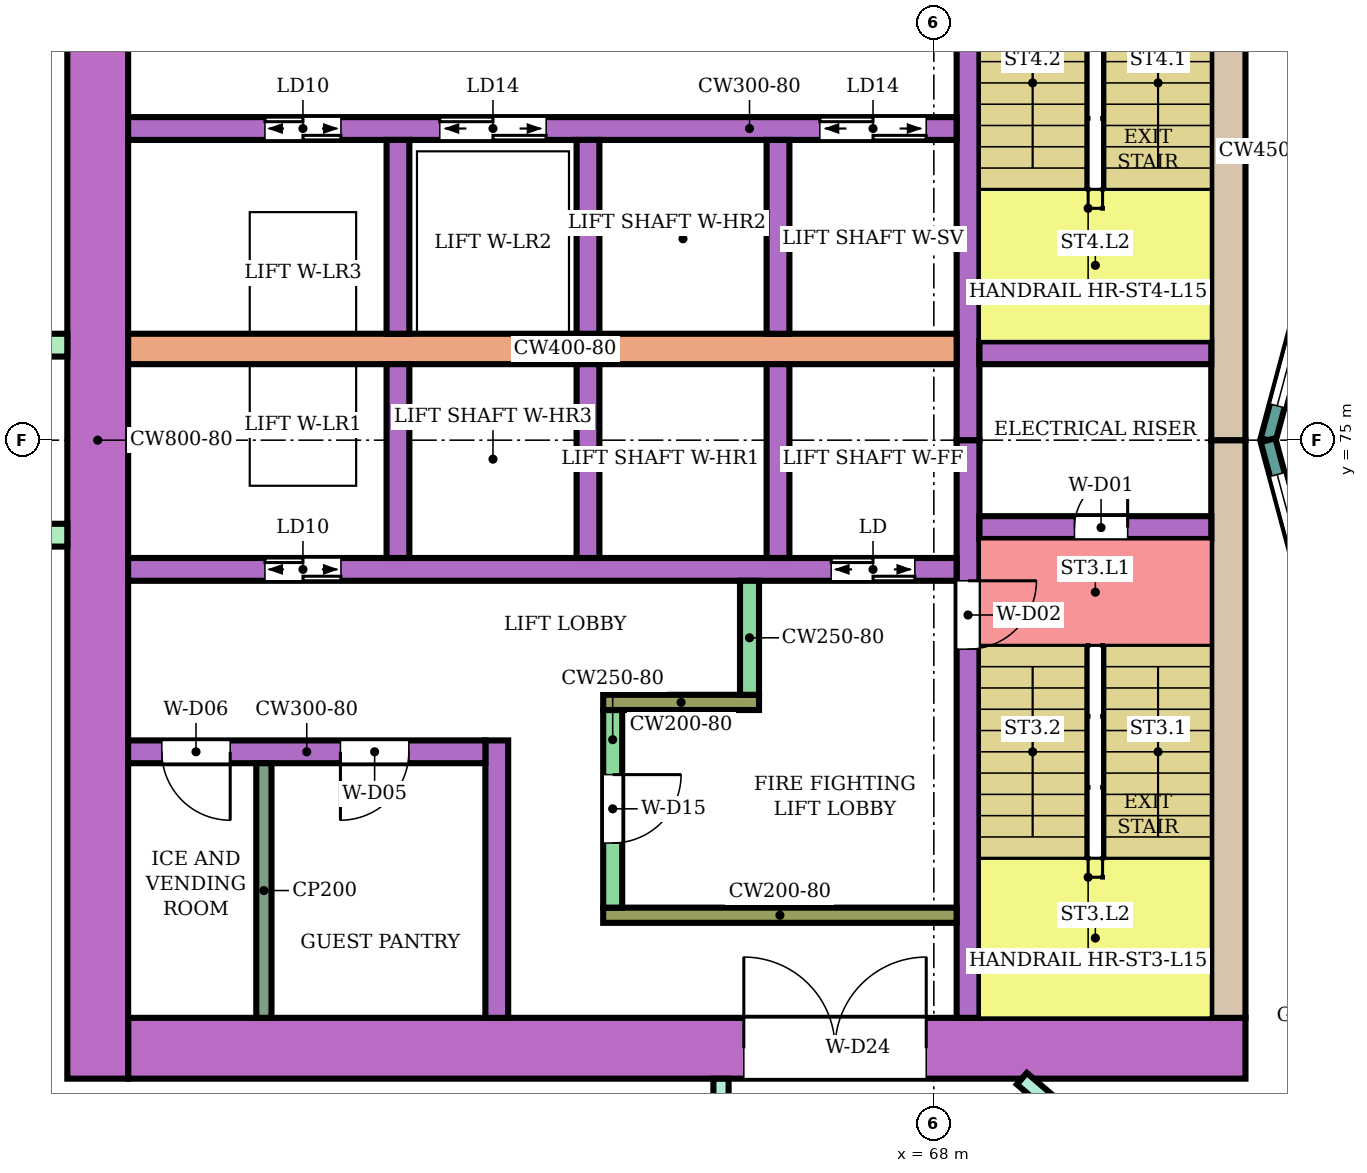
"""IFC4 building model, lengths in metres.
Left out: names, types, materials, properties, quantities, classifications, styles, units other than length and angle.
Written with IfcOpenShell. Run it as: python <this file> out.ifc"""

import sys

from ifc_helpers import new_model, si_unit, direction, frame, frame_2d, origin, place, context, subcontext, project, spatial, rectangle, extrude, element, fill, save


model = new_model("IFC4")
c1 = context("Model", 3, precision=1e-05, world=origin(), true_north=direction((0.0, 1.0)))
c2 = subcontext(c1, "Body", "Model", "MODEL_VIEW")
j1 = project(units=[si_unit("LENGTHUNIT", "METRE"), si_unit("PLANEANGLEUNIT", "RADIAN")], contexts=[c1])
p1 = place(None, origin())
s1 = spatial("IfcSite", under=j1, at=p1, CompositionType="ELEMENT")
p2 = place(p1, origin())
s2 = spatial("IfcBuilding", under=s1, at=p2, CompositionType="ELEMENT")
p3 = place(p2, frame((0.0, 0.0, 66.8)))
s3 = spatial("IfcBuildingStorey", under=s2, at=p3, CompositionType="ELEMENT", Elevation=66.8)
p4 = place(p3, frame((72.1, 67.0, 0.0), z_axis=(0.0, 0.0, 1.0), x_axis=(-1.0, 0.0, 0.0)))
e1 = element("IfcWall", 1, at=p4, inside=s3, PredefinedType="SHEAR", context=c2, shape_type="SweptSolid", body=[
    extrude(rectangle(XDim=14.7, YDim=0.8, at=frame_2d((7.35, 0.0))), origin(), (0.0, 0.0, 1.0), 3.48),
])
p5 = place(p4, frame((4.2, 0.0, 0.0)))
e2 = element("IfcOpeningElement", 2, at=p5, cuts=e1, PredefinedType="OPENING", context=c2, shape_type="SweptSolid", body=[
    extrude(rectangle(XDim=2.4, YDim=2.4, at=frame_2d((1.2, 1.2))), frame((0.0, 0.41, 0.0), z_axis=(0.0, -1.0, 0.0), x_axis=(1.0, 0.0, 0.0)), (0.0, 0.0, 1.0), 0.82),
])
for number, where, z_axis, x_axis in (
    (3, (71.875, 75.0, 0.0), (0.0, 0.0, 1.0), (0.0, -1.0, 0.0)),
    (4, (71.875, 82.6, 0.0), (0.0, 0.0, 1.0), (0.0, -1.0, 0.0)),
):
    element("IfcWall", number, at=place(p3, frame(where, z_axis=z_axis, x_axis=x_axis)), inside=s3, PredefinedType="SHEAR", context=c2, shape_type="SweptSolid", body=[
        extrude(rectangle(XDim=7.6, YDim=0.45, at=frame_2d((3.8, 0.0))), origin(), (0.0, 0.0, 1.0), 3.48),
    ])
p6 = place(p3, frame((57.0, 83.4, 0.0), z_axis=(0.0, 0.0, 1.0), x_axis=(0.0, -1.0, 0.0)))
e5 = element("IfcWall", 5, at=p6, inside=s3, PredefinedType="SHEAR", context=c2, shape_type="SweptSolid", body=[
    extrude(rectangle(XDim=16.8, YDim=0.8, at=frame_2d((8.4, 0.0))), origin(), (0.0, 0.0, 1.0), 3.48),
])
p7 = place(p3, frame((68.45, 75.0, 0.0), z_axis=(0.0, 0.0, 1.0), x_axis=(0.0, -1.0, 0.0)))
e6 = element("IfcWall", 6, at=p7, inside=s3, PredefinedType="SHEAR", context=c2, shape_type="SweptSolid", body=[
    extrude(rectangle(XDim=7.6, YDim=0.3, at=frame_2d((3.8, 0.0))), origin(), (0.0, 0.0, 1.0), 3.48),
])
p8 = place(p7, frame((1.85, 0.0, 0.0)))
e7 = element("IfcOpeningElement", 7, at=p8, cuts=e6, PredefinedType="OPENING", context=c2, shape_type="SweptSolid", body=[
    extrude(rectangle(XDim=0.9, YDim=2.1, at=frame_2d((0.45, 1.05))), frame((0.0, 0.16, 0.0), z_axis=(0.0, -1.0, 0.0), x_axis=(1.0, 0.0, 0.0)), (0.0, 0.0, 1.0), 0.32),
])
p9 = place(p3, frame((68.45, 82.6, 0.0), z_axis=(0.0, 0.0, 1.0), x_axis=(0.0, -1.0, 0.0)))
e8 = element("IfcWall", 8, at=p9, inside=s3, PredefinedType="SHEAR", context=c2, shape_type="SweptSolid", body=[
    extrude(rectangle(XDim=7.6, YDim=0.3, at=frame_2d((3.8, 0.0))), origin(), (0.0, 0.0, 1.0), 3.48),
])
p10 = place(p9, frame((0.25, 0.0, 0.0)))
e9 = element("IfcOpeningElement", 9, at=p10, cuts=e8, PredefinedType="OPENING", context=c2, shape_type="SweptSolid", body=[
    extrude(rectangle(XDim=0.9, YDim=2.1, at=frame_2d((0.45, 1.05))), frame((0.0, 0.16, 0.0), z_axis=(0.0, -1.0, 0.0), x_axis=(1.0, 0.0, 0.0)), (0.0, 0.0, 1.0), 0.32),
])
p11 = place(p3, frame((71.65, 73.85, 0.0), z_axis=(0.0, 0.0, 1.0), x_axis=(-1.0, 0.0, 0.0)))
e10 = element("IfcWall", 10, at=p11, inside=s3, PredefinedType="SHEAR", context=c2, shape_type="SweptSolid", body=[
    extrude(rectangle(XDim=3.05, YDim=0.3, at=frame_2d((1.525, 0.0))), origin(), (0.0, 0.0, 1.0), 3.48),
])
p12 = place(p11, frame((1.1, 0.0, 0.0)))
e11 = element("IfcOpeningElement", 11, at=p12, cuts=e10, PredefinedType="OPENING", context=c2, shape_type="SweptSolid", body=[
    extrude(rectangle(XDim=0.7, YDim=2.0, at=frame_2d((0.35, 1.0))), frame((0.0, 0.16, 0.0), z_axis=(0.0, -1.0, 0.0), x_axis=(1.0, 0.0, 0.0)), (0.0, 0.0, 1.0), 0.32),
])
p13 = place(p3, frame((71.65, 76.15, 0.0), z_axis=(0.0, 0.0, 1.0), x_axis=(-1.0, 0.0, 0.0)))
e12 = element("IfcWall", 12, at=p13, inside=s3, PredefinedType="SHEAR", context=c2, shape_type="SweptSolid", body=[
    extrude(rectangle(XDim=3.05, YDim=0.3, at=frame_2d((1.525, 0.0))), origin(), (0.0, 0.0, 1.0), 3.48),
])
p14 = place(p3, frame((68.3, 73.3, 0.0), z_axis=(0.0, 0.0, 1.0), x_axis=(-1.0, 0.0, 0.0)))
e13 = element("IfcWall", 13, at=p14, inside=s3, PredefinedType="SHEAR", context=c2, shape_type="SweptSolid", body=[
    extrude(rectangle(XDim=10.9, YDim=0.3, at=frame_2d((5.45, 0.0))), origin(), (0.0, 0.0, 1.0), 3.48),
])
p15 = place(p14, frame((0.55, 0.0, 0.0)))
e14 = element("IfcOpeningElement", 14, at=p15, cuts=e13, PredefinedType="OPENING", context=c2, shape_type="SweptSolid", body=[
    extrude(rectangle(XDim=1.1, YDim=2.1, at=frame_2d((0.55, 1.05))), frame((0.0, 0.16, 0.0), z_axis=(0.0, -1.0, 0.0), x_axis=(1.0, 0.0, 0.0)), (0.0, 0.0, 1.0), 0.32),
])
p16 = place(p14, frame((8.1, 0.0, 0.0)))
e15 = element("IfcOpeningElement", 15, at=p16, cuts=e13, PredefinedType="OPENING", context=c2, shape_type="SweptSolid", body=[
    extrude(rectangle(XDim=1.0, YDim=2.1, at=frame_2d((0.5, 1.05))), frame((0.0, 0.16, 0.0), z_axis=(0.0, -1.0, 0.0), x_axis=(1.0, 0.0, 0.0)), (0.0, 0.0, 1.0), 0.32),
])
p17 = place(p3, frame((68.3, 76.2, 0.0), z_axis=(0.0, 0.0, 1.0), x_axis=(-1.0, 0.0, 0.0)))
e16 = element("IfcWall", 16, at=p17, inside=s3, PredefinedType="SHEAR", context=c2, shape_type="SweptSolid", body=[
    extrude(rectangle(XDim=10.9, YDim=0.4, at=frame_2d((5.45, 0.0))), origin(), (0.0, 0.0, 1.0), 3.48),
])
p18 = place(p3, frame((68.3, 79.1, 0.0), z_axis=(0.0, 0.0, 1.0), x_axis=(-1.0, 0.0, 0.0)))
e17 = element("IfcWall", 17, at=p18, inside=s3, PredefinedType="SHEAR", context=c2, shape_type="SweptSolid", body=[
    extrude(rectangle(XDim=10.9, YDim=0.3, at=frame_2d((5.45, 0.0))), origin(), (0.0, 0.0, 1.0), 3.48),
])
p19 = place(p18, frame((0.4, 0.0, 0.0)))
e18 = element("IfcOpeningElement", 18, at=p19, cuts=e17, PredefinedType="OPENING", context=c2, shape_type="SweptSolid", body=[
    extrude(rectangle(XDim=1.4, YDim=2.1, at=frame_2d((0.7, 1.05))), frame((0.0, 0.16, 0.0), z_axis=(0.0, -1.0, 0.0), x_axis=(1.0, 0.0, 0.0)), (0.0, 0.0, 1.0), 0.32),
])
p20 = place(p18, frame((5.4, 0.0, 0.0)))
e19 = element("IfcOpeningElement", 19, at=p20, cuts=e17, PredefinedType="OPENING", context=c2, shape_type="SweptSolid", body=[
    extrude(rectangle(XDim=1.4, YDim=2.1, at=frame_2d((0.7, 1.05))), frame((0.0, 0.16, 0.0), z_axis=(0.0, -1.0, 0.0), x_axis=(1.0, 0.0, 0.0)), (0.0, 0.0, 1.0), 0.32),
])
p21 = place(p18, frame((8.1, 0.0, 0.0)))
e20 = element("IfcOpeningElement", 20, at=p21, cuts=e17, PredefinedType="OPENING", context=c2, shape_type="SweptSolid", body=[
    extrude(rectangle(XDim=1.0, YDim=2.1, at=frame_2d((0.5, 1.05))), frame((0.0, 0.16, 0.0), z_axis=(0.0, -1.0, 0.0), x_axis=(1.0, 0.0, 0.0)), (0.0, 0.0, 1.0), 0.32),
])
for number, where, z_axis, x_axis in (
    (21, (65.95, 76.0, 0.0), (0.0, 0.0, 1.0), (0.0, -1.0, 0.0)),
    (22, (63.45, 76.0, 0.0), (0.0, 0.0, 1.0), (0.0, -1.0, 0.0)),
    (23, (60.95, 76.0, 0.0), (0.0, 0.0, 1.0), (0.0, -1.0, 0.0)),
    (24, (65.95, 78.95, 0.0), (0.0, 0.0, 1.0), (0.0, -1.0, 0.0)),
    (25, (63.45, 78.95, 0.0), (0.0, 0.0, 1.0), (0.0, -1.0, 0.0)),
    (26, (60.95, 78.95, 0.0), (0.0, 0.0, 1.0), (0.0, -1.0, 0.0)),
):
    element("IfcWall", number, at=place(p3, frame(where, z_axis=z_axis, x_axis=x_axis)), inside=s3, PredefinedType="SHEAR", context=c2, shape_type="SweptSolid", body=[
        extrude(rectangle(XDim=2.55, YDim=0.3, at=frame_2d((1.275, 0.0))), origin(), (0.0, 0.0, 1.0), 3.48),
    ])
p22 = place(p3, frame((68.3, 68.75, 0.0), z_axis=(0.0, 0.0, 1.0), x_axis=(-1.0, 0.0, 0.0)))
e27 = element("IfcWall", 27, at=p22, inside=s3, PredefinedType="SHEAR", context=c2, shape_type="SweptSolid", body=[
    extrude(rectangle(XDim=4.65, YDim=0.2, at=frame_2d((2.325, 0.0))), origin(), (0.0, 0.0, 1.0), 3.48),
])
p23 = place(p3, frame((63.775, 71.45, 0.0), z_axis=(0.0, 0.0, 1.0), x_axis=(0.0, -1.0, 0.0)))
e28 = element("IfcWall", 28, at=p23, inside=s3, PredefinedType="SHEAR", context=c2, shape_type="SweptSolid", body=[
    extrude(rectangle(XDim=2.6, YDim=0.25, at=frame_2d((1.3, 0.0))), origin(), (0.0, 0.0, 1.0), 3.48),
])
p24 = place(p23, frame((0.85, 0.0, 0.0)))
e29 = element("IfcOpeningElement", 29, at=p24, cuts=e28, PredefinedType="OPENING", context=c2, shape_type="SweptSolid", body=[
    extrude(rectangle(XDim=0.9, YDim=2.1, at=frame_2d((0.45, 1.05))), frame((0.0, 0.135, 0.0), z_axis=(0.0, -1.0, 0.0), x_axis=(1.0, 0.0, 0.0)), (0.0, 0.0, 1.0), 0.27),
])
p25 = place(p3, frame((65.7, 71.55, 0.0), z_axis=(0.0, 0.0, 1.0), x_axis=(-1.0, 0.0, 0.0)))
e30 = element("IfcWall", 30, at=p25, inside=s3, PredefinedType="SHEAR", context=c2, shape_type="SweptSolid", body=[
    extrude(rectangle(XDim=2.05, YDim=0.2, at=frame_2d((1.025, 0.0))), origin(), (0.0, 0.0, 1.0), 3.48),
])
p26 = place(p3, frame((65.575, 73.15, 0.0), z_axis=(0.0, 0.0, 1.0), x_axis=(0.0, -1.0, 0.0)))
e31 = element("IfcWall", 31, at=p26, inside=s3, PredefinedType="SHEAR", context=c2, shape_type="SweptSolid", body=[
    extrude(rectangle(XDim=1.5, YDim=0.25, at=frame_2d((0.75, 0.0))), origin(), (0.0, 0.0, 1.0), 3.48),
])
p27 = place(p3, frame((62.25, 71.05, 0.0), z_axis=(0.0, 0.0, 1.0), x_axis=(0.0, -1.0, 0.0)))
e32 = element("IfcWall", 32, at=p27, inside=s3, PredefinedType="SHEAR", context=c2, shape_type="SweptSolid", body=[
    extrude(rectangle(XDim=3.65, YDim=0.3, at=frame_2d((1.825, 0.0))), origin(), (0.0, 0.0, 1.0), 3.48),
])
p28 = place(p3, frame((62.1, 70.9, 0.0), z_axis=(0.0, 0.0, 1.0), x_axis=(-1.0, 0.0, 0.0)))
e33 = element("IfcWall", 33, at=p28, inside=s3, PredefinedType="SHEAR", context=c2, shape_type="SweptSolid", body=[
    extrude(rectangle(XDim=4.7, YDim=0.3, at=frame_2d((2.35, 0.0))), origin(), (0.0, 0.0, 1.0), 3.48),
])
p29 = place(p28, frame((1.007, 0.0, 0.0)))
e34 = element("IfcOpeningElement", 34, at=p29, cuts=e33, PredefinedType="OPENING", context=c2, shape_type="SweptSolid", body=[
    extrude(rectangle(XDim=0.9, YDim=2.1, at=frame_2d((0.45, 1.05))), frame((0.0, 0.16, 0.0), z_axis=(0.0, -1.0, 0.0), x_axis=(1.0, 0.0, 0.0)), (0.0, 0.0, 1.0), 0.32),
])
p30 = place(p28, frame((3.357, 0.0, 0.0)))
e35 = element("IfcOpeningElement", 35, at=p30, cuts=e33, PredefinedType="OPENING", context=c2, shape_type="SweptSolid", body=[
    extrude(rectangle(XDim=0.9, YDim=2.1, at=frame_2d((0.45, 1.05))), frame((0.0, 0.16, 0.0), z_axis=(0.0, -1.0, 0.0), x_axis=(1.0, 0.0, 0.0)), (0.0, 0.0, 1.0), 0.32),
])
for number, where, z_axis, x_axis in (
    (36, (56.6, 76.25, 0.0), (0.0, 0.0, 1.0), (-1.0, 0.0, 0.0)),
    (37, (56.6, 73.75, 0.0), (0.0, 0.0, 1.0), (-1.0, 0.0, 0.0)),
):
    element("IfcWall", number, at=place(p3, frame(where, z_axis=z_axis, x_axis=x_axis)), inside=s3, PredefinedType="NOTDEFINED", context=c2, shape_type="SweptSolid", body=[
        extrude(rectangle(XDim=2.416, YDim=0.3, at=frame_2d((1.208, 0.0))), origin(), (0.0, 0.0, 1.0), 3.8),
    ])
p31 = place(p3, frame((73.415, 78.802, 0.0), z_axis=(0.0, 0.0, 1.0), x_axis=(-0.258789828301, -0.965933654434, 0.0)))
e38 = element("IfcWall", 38, at=p31, inside=s3, PredefinedType="NOTDEFINED", context=c2, shape_type="SweptSolid", body=[
    extrude(rectangle(XDim=3.936, YDim=0.2, at=frame_2d((1.968, 0.0))), origin(), (0.0, 0.0, 1.0), 3.8),
])
p32 = place(p31, frame((0.468, 0.0, 0.9)))
e39 = element("IfcOpeningElement", 39, at=p32, cuts=e38, PredefinedType="OPENING", context=c2, shape_type="SweptSolid", body=[
    extrude(rectangle(XDim=3.0, YDim=2.3, at=frame_2d((1.5, 1.15))), frame((0.0, 0.11, 0.0), z_axis=(0.0, -1.0, 0.0), x_axis=(1.0, 0.0, 0.0)), (0.0, 0.0, 1.0), 0.22),
])
p33 = place(p3, frame((72.396, 75.0, 0.0), z_axis=(0.0, 0.0, 1.0), x_axis=(0.258789828301, -0.965933654434, 0.0)))
e40 = element("IfcWall", 40, at=p33, inside=s3, PredefinedType="NOTDEFINED", context=c2, shape_type="SweptSolid", body=[
    extrude(rectangle(XDim=3.936, YDim=0.2, at=frame_2d((1.968, 0.0))), origin(), (0.0, 0.0, 1.0), 3.8),
])
p34 = place(p33, frame((0.468, 0.0, 0.9)))
e41 = element("IfcOpeningElement", 41, at=p34, cuts=e40, PredefinedType="OPENING", context=c2, shape_type="SweptSolid", body=[
    extrude(rectangle(XDim=3.0, YDim=2.3, at=frame_2d((1.5, 1.15))), frame((0.0, 0.11, 0.0), z_axis=(0.0, -1.0, 0.0), x_axis=(1.0, 0.0, 0.0)), (0.0, 0.0, 1.0), 0.22),
])
p35 = place(p3, frame((65.2, 65.2, 0.0), z_axis=(0.0, 0.0, 1.0), x_axis=(0.0, 1.0, 0.0)))
e42 = element("IfcWall", 42, at=p35, inside=s3, PredefinedType="PARTITIONING", context=c2, shape_type="SweptSolid", body=[
    extrude(rectangle(XDim=1.399, YDim=0.2, at=frame_2d((0.7, 0.0))), origin(), (0.0, 0.0, 1.0), 3.35),
])
p36 = place(p3, frame((69.158, 66.6, 0.0), z_axis=(0.0, 0.0, 1.0), x_axis=(0.757976058094, -0.652282373943, 0.0)))
e43 = element("IfcWall", 43, at=p36, inside=s3, PredefinedType="PARTITIONING", context=c2, shape_type="SweptSolid", body=[
    extrude(rectangle(XDim=5.16, YDim=0.2, at=frame_2d((2.58, 0.0))), origin(), (0.0, 0.0, 1.0), 3.35),
])
p37 = place(p36, frame((1.6, 0.0, 0.0)))
e44 = element("IfcOpeningElement", 44, at=p37, cuts=e43, PredefinedType="OPENING", context=c2, shape_type="SweptSolid", body=[
    extrude(rectangle(XDim=1.0, YDim=2.1, at=frame_2d((0.5, 1.05))), frame((0.0, 0.11, 0.0), z_axis=(0.0, -1.0, 0.0), x_axis=(1.0, 0.0, 0.0)), (0.0, 0.0, 1.0), 0.22),
])
p38 = place(p3, frame((71.596, 64.635, 0.0), z_axis=(0.0, 0.0, 1.0), x_axis=(0.652285007511, 0.757973791748, 0.0)))
e45 = element("IfcWall", 45, at=p38, inside=s3, PredefinedType="PARTITIONING", context=c2, shape_type="SweptSolid", body=[
    extrude(rectangle(XDim=2.65, YDim=0.1, at=frame_2d((1.325, 0.0))), origin(), (0.0, 0.0, 1.0), 3.35),
])
p39 = place(p38, frame((0.6, 0.0, 0.0)))
e46 = element("IfcOpeningElement", 46, at=p39, cuts=e45, PredefinedType="OPENING", context=c2, shape_type="SweptSolid", body=[
    extrude(rectangle(XDim=0.8, YDim=2.1, at=frame_2d((0.4, 1.05))), frame((0.0, 0.06, 0.0), z_axis=(0.0, -1.0, 0.0), x_axis=(1.0, 0.0, 0.0)), (0.0, 0.0, 1.0), 0.12),
])
p40 = place(p3, frame((59.186, 70.75, 0.0), z_axis=(0.0, 0.0, 1.0), x_axis=(0.0, -1.0, 0.0)))
e47 = element("IfcWall", 47, at=p40, inside=s3, PredefinedType="PARTITIONING", context=c2, shape_type="SweptSolid", body=[
    extrude(rectangle(XDim=3.35, YDim=0.2, at=frame_2d((1.675, 0.0))), origin(), (0.0, 0.0, 1.0), 3.48),
])
p41 = place(p32, origin())
e48 = element("IfcWindow", 48, at=p41, inside=s3, PartitioningType="SINGLE_PANEL", PredefinedType="WINDOW", context=c2, shape_type="SweptSolid", body=[
    extrude(rectangle(XDim=3.0, YDim=2.3, at=frame_2d((1.5, 1.15))), frame((0.0, 0.03, 0.0), z_axis=(0.0, -1.0, 0.0), x_axis=(1.0, 0.0, 0.0)), (0.0, 0.0, 1.0), 0.06),
])
fill(e39, e48)
p42 = place(p34, origin())
e49 = element("IfcWindow", 49, at=p42, inside=s3, PartitioningType="SINGLE_PANEL", PredefinedType="WINDOW", context=c2, shape_type="SweptSolid", body=[
    extrude(rectangle(XDim=3.0, YDim=2.3, at=frame_2d((1.5, 1.15))), frame((0.0, 0.03, 0.0), z_axis=(0.0, -1.0, 0.0), x_axis=(1.0, 0.0, 0.0)), (0.0, 0.0, 1.0), 0.06),
])
fill(e41, e49)
p43 = place(p12, frame((0.7, 0.0, 0.0), z_axis=(0.0, 0.0, 1.0), x_axis=(-1.0, 0.0, 0.0)))
e50 = element("IfcDoor", 50, at=p43, inside=s3, OperationType="SINGLE_SWING_RIGHT", PredefinedType="DOOR", context=c2, shape_type="SweptSolid", body=[
    extrude(rectangle(XDim=0.7, YDim=2.0, at=frame_2d((0.35, 1.0))), frame((0.0, 0.025, 0.0), z_axis=(0.0, -1.0, 0.0), x_axis=(1.0, 0.0, 0.0)), (0.0, 0.0, 1.0), 0.05),
])
fill(e11, e50)
p44 = place(p8, origin())
e51 = element("IfcDoor", 51, at=p44, inside=s3, OperationType="SINGLE_SWING_LEFT", PredefinedType="DOOR", context=c2, shape_type="SweptSolid", body=[
    extrude(rectangle(XDim=0.9, YDim=2.1, at=frame_2d((0.45, 1.05))), frame((0.0, 0.025, 0.0), z_axis=(0.0, -1.0, 0.0), x_axis=(1.0, 0.0, 0.0)), (0.0, 0.0, 1.0), 0.05),
])
fill(e7, e51)
p45 = place(p15, origin())
e52 = element("IfcDoor", 52, at=p45, inside=s3, OperationType="DOUBLE_DOOR_SLIDING", PredefinedType="DOOR", context=c2, shape_type="SweptSolid", body=[
    extrude(rectangle(XDim=1.1, YDim=2.1, at=frame_2d((0.55, 1.05))), frame((0.0, 0.025, 0.0), z_axis=(0.0, -1.0, 0.0), x_axis=(1.0, 0.0, 0.0)), (0.0, 0.0, 1.0), 0.05),
])
fill(e14, e52)
p46 = place(p16, origin())
e53 = element("IfcDoor", 53, at=p46, inside=s3, OperationType="DOUBLE_DOOR_SLIDING", PredefinedType="DOOR", context=c2, shape_type="SweptSolid", body=[
    extrude(rectangle(XDim=1.0, YDim=2.1, at=frame_2d((0.5, 1.05))), frame((0.0, 0.025, 0.0), z_axis=(0.0, -1.0, 0.0), x_axis=(1.0, 0.0, 0.0)), (0.0, 0.0, 1.0), 0.05),
])
fill(e15, e53)
p47 = place(p19, origin())
e54 = element("IfcDoor", 54, at=p47, inside=s3, OperationType="DOUBLE_DOOR_SLIDING", PredefinedType="DOOR", context=c2, shape_type="SweptSolid", body=[
    extrude(rectangle(XDim=1.4, YDim=2.1, at=frame_2d((0.7, 1.05))), frame((0.0, 0.025, 0.0), z_axis=(0.0, -1.0, 0.0), x_axis=(1.0, 0.0, 0.0)), (0.0, 0.0, 1.0), 0.05),
])
fill(e18, e54)
p48 = place(p20, origin())
e55 = element("IfcDoor", 55, at=p48, inside=s3, OperationType="DOUBLE_DOOR_SLIDING", PredefinedType="DOOR", context=c2, shape_type="SweptSolid", body=[
    extrude(rectangle(XDim=1.4, YDim=2.1, at=frame_2d((0.7, 1.05))), frame((0.0, 0.025, 0.0), z_axis=(0.0, -1.0, 0.0), x_axis=(1.0, 0.0, 0.0)), (0.0, 0.0, 1.0), 0.05),
])
fill(e19, e55)
p49 = place(p21, origin())
e56 = element("IfcDoor", 56, at=p49, inside=s3, OperationType="DOUBLE_DOOR_SLIDING", PredefinedType="DOOR", context=c2, shape_type="SweptSolid", body=[
    extrude(rectangle(XDim=1.0, YDim=2.1, at=frame_2d((0.5, 1.05))), frame((0.0, 0.025, 0.0), z_axis=(0.0, -1.0, 0.0), x_axis=(1.0, 0.0, 0.0)), (0.0, 0.0, 1.0), 0.05),
])
fill(e20, e56)
p50 = place(p24, origin())
e57 = element("IfcDoor", 57, at=p50, inside=s3, OperationType="SINGLE_SWING_LEFT", PredefinedType="DOOR", context=c2, shape_type="SweptSolid", body=[
    extrude(rectangle(XDim=0.9, YDim=2.1, at=frame_2d((0.45, 1.05))), frame((0.0, 0.025, 0.0), z_axis=(0.0, -1.0, 0.0), x_axis=(1.0, 0.0, 0.0)), (0.0, 0.0, 1.0), 0.05),
])
fill(e29, e57)
p51 = place(p29, origin())
e58 = element("IfcDoor", 58, at=p51, inside=s3, OperationType="SINGLE_SWING_RIGHT", PredefinedType="DOOR", context=c2, shape_type="SweptSolid", body=[
    extrude(rectangle(XDim=0.9, YDim=2.1, at=frame_2d((0.45, 1.05))), frame((0.0, 0.025, 0.0), z_axis=(0.0, -1.0, 0.0), x_axis=(1.0, 0.0, 0.0)), (0.0, 0.0, 1.0), 0.05),
])
fill(e34, e58)
p52 = place(p30, origin())
e59 = element("IfcDoor", 59, at=p52, inside=s3, OperationType="SINGLE_SWING_LEFT", PredefinedType="DOOR", context=c2, shape_type="SweptSolid", body=[
    extrude(rectangle(XDim=0.9, YDim=2.1, at=frame_2d((0.45, 1.05))), frame((0.0, 0.025, 0.0), z_axis=(0.0, -1.0, 0.0), x_axis=(1.0, 0.0, 0.0)), (0.0, 0.0, 1.0), 0.05),
])
fill(e35, e59)
p53 = place(p5, frame((2.4, 0.0, 0.0), z_axis=(0.0, 0.0, 1.0), x_axis=(-1.0, 0.0, 0.0)))
e60 = element("IfcDoor", 60, at=p53, inside=s3, OperationType="DOUBLE_DOOR_SINGLE_SWING", PredefinedType="DOOR", context=c2, shape_type="SweptSolid", body=[
    extrude(rectangle(XDim=2.4, YDim=2.4, at=frame_2d((1.2, 1.2))), frame((0.0, 0.025, 0.0), z_axis=(0.0, -1.0, 0.0), x_axis=(1.0, 0.0, 0.0)), (0.0, 0.0, 1.0), 0.05),
])
fill(e2, e60)
save(model, sys.argv[1])
